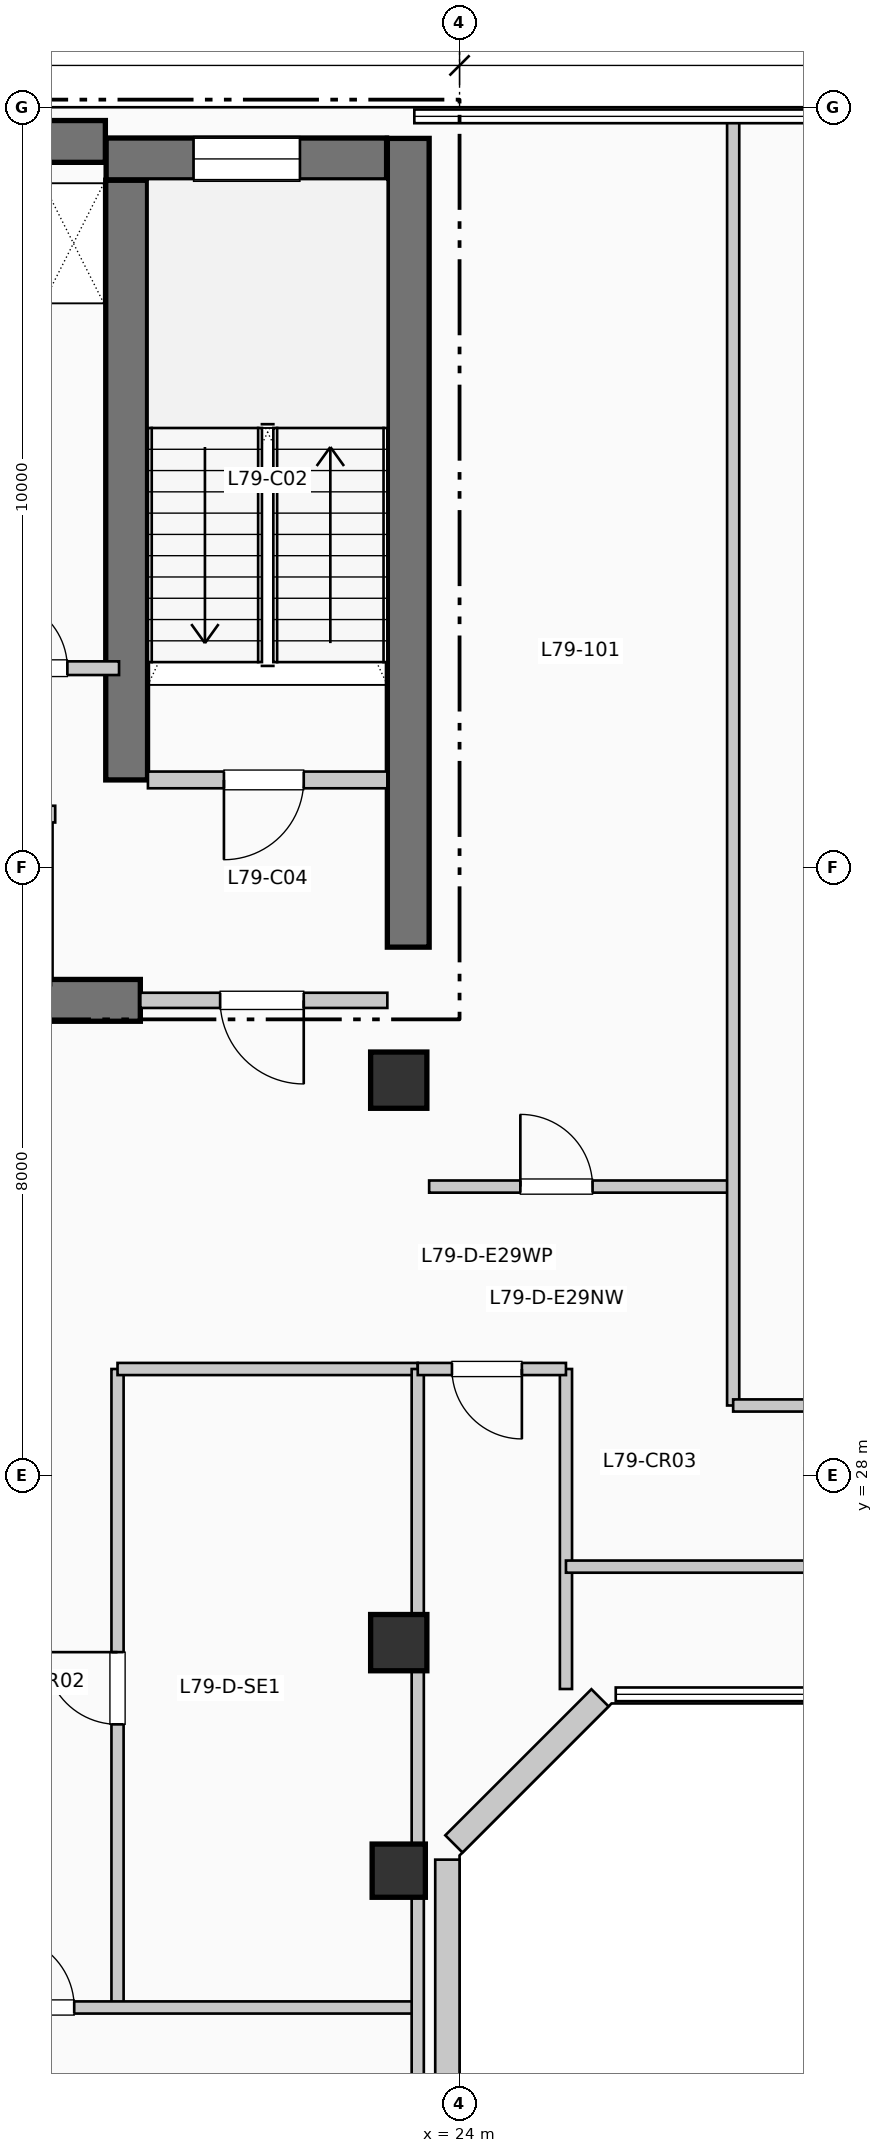
"""IFC4 building model, lengths in metres.
Left out: names, types, materials, properties, quantities, classifications, styles, units other than length and angle.
Written with IfcOpenShell. Run it as: python <this file> out.ifc"""

import sys

from ifc_helpers import new_model, si_unit, direction, frame, frame_2d, origin, origin_2d, place, context, subcontext, project, spatial, rectangle, extrude, element, fill, save


model = new_model("IFC4")
c1 = context("Model", 3, precision=1e-05, world=origin(), true_north=direction((0.0, 1.0)))
c2 = subcontext(c1, "Body", "Model", "MODEL_VIEW")
j1 = project(units=[si_unit("LENGTHUNIT", "METRE"), si_unit("PLANEANGLEUNIT", "RADIAN")], contexts=[c1])
p1 = place(None, origin())
s1 = spatial("IfcSite", under=j1, at=p1, CompositionType="ELEMENT")
p2 = place(p1, origin())
s2 = spatial("IfcBuilding", under=s1, at=p2, CompositionType="ELEMENT")
p3 = place(p2, frame((0.0, 0.0, 323.73)))
s3 = spatial("IfcBuildingStorey", under=s2, at=p3, CompositionType="ELEMENT", Elevation=323.73)
p4 = place(p3, frame((5.36, 45.55, 0.0), z_axis=(0.0, 0.0, 1.0), x_axis=(1.0, 0.0, 0.0)))
e1 = element("IfcWall", 1, at=p4, inside=s3, PredefinedType="SHEAR", context=c2, shape_type="SweptSolid", body=[
    extrude(rectangle(XDim=13.98, YDim=0.55, at=frame_2d((6.99, 0.0))), origin(), (0.0, 0.0, 1.0), 3.96),
])
p5 = place(p3, frame((23.325, 34.95, 0.0), z_axis=(0.0, 0.0, 1.0), x_axis=(0.0, 1.0, 0.0)))
e2 = element("IfcWall", 2, at=p5, inside=s3, PredefinedType="SHEAR", context=c2, shape_type="SweptSolid", body=[
    extrude(rectangle(XDim=10.64, YDim=0.55, at=frame_2d((5.32, 0.0))), origin(), (0.0, 0.0, 1.0), 3.96),
])
p6 = place(p3, frame((13.68, 34.25, 0.0), z_axis=(0.0, 0.0, 1.0), x_axis=(1.0, 0.0, 0.0)))
e3 = element("IfcWall", 3, at=p6, inside=s3, PredefinedType="SHEAR", context=c2, shape_type="SweptSolid", body=[
    extrude(rectangle(XDim=6.12, YDim=0.55, at=frame_2d((3.06, 0.0))), origin(), (0.0, 0.0, 1.0), 3.96),
])
p7 = place(p3, frame((19.62, 37.15, 0.0), z_axis=(0.0, 0.0, 1.0), x_axis=(0.0, 1.0, 0.0)))
e4 = element("IfcWall", 4, at=p7, inside=s3, PredefinedType="SHEAR", context=c2, shape_type="SweptSolid", body=[
    extrude(rectangle(XDim=7.89, YDim=0.55, at=frame_2d((3.945, 0.0))), origin(), (0.0, 0.0, 1.0), 3.96),
])
p8 = place(p3, frame((19.35, 45.32, 0.0), z_axis=(0.0, 0.0, 1.0), x_axis=(1.0, 0.0, 0.0)))
e5 = element("IfcWall", 5, at=p8, inside=s3, PredefinedType="SHEAR", context=c2, shape_type="SweptSolid", body=[
    extrude(rectangle(XDim=3.69, YDim=0.55, at=frame_2d((1.845, 0.0))), origin(), (0.0, 0.0, 1.0), 3.96),
])
p9 = place(p8, frame((1.15, 0.0, 1.05)))
e6 = element("IfcOpeningElement", 6, at=p9, cuts=e5, PredefinedType="OPENING", context=c2, shape_type="SweptSolid", body=[
    extrude(rectangle(XDim=1.4, YDim=1.8, at=frame_2d((0.7, 0.9))), frame((0.0, 0.285, 0.0), z_axis=(0.0, -1.0, 0.0), x_axis=(1.0, 0.0, 0.0)), (0.0, 0.0, 1.0), 0.57),
])
p10 = place(p3, frame((23.2, 22.8, 0.0), z_axis=(0.0, 0.0, 1.0), x_axis=(1.0, 0.0, 0.0)))
e7 = element("IfcColumn", 7, at=p10, inside=s3, PredefinedType="COLUMN", context=c2, shape_type="SweptSolid", body=[
    extrude(rectangle(XDim=0.7, YDim=0.7, at=origin_2d()), origin(), (0.0, 0.0, 1.0), 3.96),
])
for number, where, z_axis, x_axis in (
    (8, (23.2, 25.8, 0.0), (0.0, 0.0, 1.0), (1.0, 0.0, 0.0)),
    (9, (23.2, 33.2, 0.0), (0.0, 0.0, 1.0), (1.0, 0.0, 0.0)),
):
    element("IfcColumn", number, at=place(p3, frame(where, z_axis=z_axis, x_axis=x_axis)), inside=s3, PredefinedType="COLUMN", context=c2, shape_type="SweptSolid", body=[
        extrude(rectangle(XDim=0.74, YDim=0.74, at=origin_2d()), origin(), (0.0, 0.0, 1.0), 3.96),
    ])
p11 = place(p3, frame((23.84, 8.855, 0.0), z_axis=(0.0, 0.0, 1.0), x_axis=(0.0, 1.0, 0.0)))
e10 = element("IfcWall", 10, at=p11, inside=s3, PredefinedType="SOLIDWALL", context=c2, shape_type="SweptSolid", body=[
    extrude(rectangle(XDim=14.09, YDim=0.32, at=frame_2d((7.045, 0.0))), origin(), (0.0, 0.0, 1.0), 3.74),
])
p12 = place(p3, frame((23.926, 23.152, 0.0), z_axis=(0.0, 0.0, 1.0), x_axis=(0.707106781187, 0.707106781187, 0.0)))
e11 = element("IfcWall", 11, at=p12, inside=s3, PredefinedType="SOLIDWALL", context=c2, shape_type="SweptSolid", body=[
    extrude(rectangle(XDim=2.718, YDim=0.32, at=frame_2d((1.359, 0.0))), origin(), (0.0, 0.0, 1.0), 3.74),
])
p13 = place(p3, frame((19.9, 37.15, 0.0), z_axis=(0.0, 0.0, 1.0), x_axis=(1.0, 0.0, 0.0)))
e12 = element("IfcWall", 12, at=p13, inside=s3, PredefinedType="PARTITIONING", context=c2, shape_type="SweptSolid", body=[
    extrude(rectangle(XDim=3.15, YDim=0.22, at=frame_2d((1.575, 0.0))), origin(), (0.0, 0.0, 1.0), 3.74),
])
p14 = place(p13, frame((2.05, 0.0, 0.0), z_axis=(0.0, 0.0, 1.0), x_axis=(-1.0, 0.0, 0.0)))
e13 = element("IfcOpeningElement", 13, at=p14, cuts=e12, PredefinedType="OPENING", context=c2, shape_type="SweptSolid", body=[
    extrude(rectangle(XDim=1.05, YDim=2.15, at=frame_2d((0.525, 1.075))), frame((0.0, 0.12, 0.0), z_axis=(0.0, -1.0, 0.0), x_axis=(1.0, 0.0, 0.0)), (0.0, 0.0, 1.0), 0.24),
])
p15 = place(p3, frame((19.8, 34.25, 0.0), z_axis=(0.0, 0.0, 1.0), x_axis=(1.0, 0.0, 0.0)))
e14 = element("IfcWall", 14, at=p15, inside=s3, PredefinedType="PARTITIONING", context=c2, shape_type="SweptSolid", body=[
    extrude(rectangle(XDim=3.25, YDim=0.2, at=frame_2d((1.625, 0.0))), origin(), (0.0, 0.0, 1.0), 3.74),
])
p16 = place(p15, frame((2.15, 0.0, 0.0), z_axis=(0.0, 0.0, 1.0), x_axis=(-1.0, 0.0, 0.0)))
e15 = element("IfcOpeningElement", 15, at=p16, cuts=e14, PredefinedType="OPENING", context=c2, shape_type="SweptSolid", body=[
    extrude(rectangle(XDim=1.1, YDim=2.15, at=frame_2d((0.55, 1.075))), frame((0.0, 0.11, 0.0), z_axis=(0.0, -1.0, 0.0), x_axis=(1.0, 0.0, 0.0)), (0.0, 0.0, 1.0), 0.22),
])
p17 = place(p3, frame((17.68, 38.62, 0.0), z_axis=(0.0, 0.0, 1.0), x_axis=(1.0, 0.0, 0.0)))
e16 = element("IfcWall", 16, at=p17, inside=s3, PredefinedType="PARTITIONING", context=c2, shape_type="SweptSolid", body=[
    extrude(rectangle(XDim=1.84, YDim=0.18, at=frame_2d((0.92, 0.0))), origin(), (0.0, 0.0, 1.0), 3.74),
])
p18 = place(p17, frame((0.24, 0.0, 0.0)))
e17 = element("IfcOpeningElement", 17, at=p18, cuts=e16, PredefinedType="OPENING", context=c2, shape_type="SweptSolid", body=[
    extrude(rectangle(XDim=0.92, YDim=2.1, at=frame_2d((0.46, 1.05))), frame((0.0, 0.1, 0.0), z_axis=(0.0, -1.0, 0.0), x_axis=(1.0, 0.0, 0.0)), (0.0, 0.0, 1.0), 0.2),
])
p19 = place(p3, frame((16.98, 36.7, 0.0), z_axis=(0.0, 0.0, 1.0), x_axis=(1.0, 0.0, 0.0)))
e18 = element("IfcWall", 18, at=p19, inside=s3, PredefinedType="PARTITIONING", context=c2, shape_type="SweptSolid", body=[
    extrude(rectangle(XDim=1.7, YDim=0.22, at=frame_2d((0.85, 0.0))), origin(), (0.0, 0.0, 1.0), 3.74),
])
p20 = place(p19, frame((0.3, 0.0, 0.0)))
e19 = element("IfcOpeningElement", 19, at=p20, cuts=e18, PredefinedType="OPENING", context=c2, shape_type="SweptSolid", body=[
    extrude(rectangle(XDim=1.1, YDim=2.2, at=frame_2d((0.55, 1.1))), frame((0.0, 0.12, 0.0), z_axis=(0.0, -1.0, 0.0), x_axis=(1.0, 0.0, 0.0)), (0.0, 0.0, 1.0), 0.24),
])
p21 = place(p3, frame((19.5, 21.0, 0.0), z_axis=(0.0, 0.0, 1.0), x_axis=(0.0, 1.0, 0.0)))
e20 = element("IfcWall", 20, at=p21, inside=s3, PredefinedType="PARTITIONING", context=c2, shape_type="SweptSolid", body=[
    extrude(rectangle(XDim=8.4, YDim=0.16, at=frame_2d((4.2, 0.0))), origin(), (0.0, 0.0, 1.0), 3.74),
])
p22 = place(p21, frame((3.725, 0.0, 0.0)))
e21 = element("IfcOpeningElement", 21, at=p22, cuts=e20, PredefinedType="OPENING", context=c2, shape_type="SweptSolid", body=[
    extrude(rectangle(XDim=0.95, YDim=2.15, at=frame_2d((0.475, 1.075))), frame((0.0, 0.09, 0.0), z_axis=(0.0, -1.0, 0.0), x_axis=(1.0, 0.0, 0.0)), (0.0, 0.0, 1.0), 0.18),
])
p23 = place(p3, frame((0.19, 21.0, 0.0), z_axis=(0.0, 0.0, 1.0), x_axis=(1.0, 0.0, 0.0)))
e22 = element("IfcWall", 22, at=p23, inside=s3, PredefinedType="PARTITIONING", context=c2, shape_type="SweptSolid", body=[
    extrude(rectangle(XDim=23.26, YDim=0.16, at=frame_2d((11.63, 0.0))), origin(), (0.0, 0.0, 1.0), 3.74),
])
p24 = place(p23, frame((17.79, 0.0, 0.0)))
e23 = element("IfcOpeningElement", 23, at=p24, cuts=e22, PredefinedType="OPENING", context=c2, shape_type="SweptSolid", body=[
    extrude(rectangle(XDim=0.95, YDim=2.15, at=frame_2d((0.475, 1.075))), frame((0.0, 0.09, 0.0), z_axis=(0.0, -1.0, 0.0), x_axis=(1.0, 0.0, 0.0)), (0.0, 0.0, 1.0), 0.18),
])
p25 = place(p3, frame((19.5, 29.4, 0.0), z_axis=(0.0, 0.0, 1.0), x_axis=(1.0, 0.0, 0.0)))
e24 = element("IfcWall", 24, at=p25, inside=s3, PredefinedType="PARTITIONING", context=c2, shape_type="SweptSolid", body=[
    extrude(rectangle(XDim=3.95, YDim=0.16, at=frame_2d((1.975, 0.0))), origin(), (0.0, 0.0, 1.0), 3.425),
])
p26 = place(p3, frame((23.45, 5.99, 0.0), z_axis=(0.0, 0.0, 1.0), x_axis=(0.0, 1.0, 0.0)))
e25 = element("IfcWall", 25, at=p26, inside=s3, PredefinedType="PARTITIONING", context=c2, shape_type="SweptSolid", body=[
    extrude(rectangle(XDim=23.41, YDim=0.16, at=frame_2d((11.705, 0.0))), origin(), (0.0, 0.0, 1.0), 3.175),
])
p27 = place(p3, frame((25.4, 25.19, 0.0), z_axis=(0.0, 0.0, 1.0), x_axis=(0.0, 1.0, 0.0)))
e26 = element("IfcWall", 26, at=p27, inside=s3, PredefinedType="PARTITIONING", context=c2, shape_type="SweptSolid", body=[
    extrude(rectangle(XDim=4.21, YDim=0.16, at=frame_2d((2.105, 0.0))), origin(), (0.0, 0.0, 1.0), 3.74),
])
p28 = place(p3, frame((23.6, 31.8, 0.0), z_axis=(0.0, 0.0, 1.0), x_axis=(1.0, 0.0, 0.0)))
e27 = element("IfcWall", 27, at=p28, inside=s3, PredefinedType="PARTITIONING", context=c2, shape_type="SweptSolid", body=[
    extrude(rectangle(XDim=4.0, YDim=0.16, at=frame_2d((2.0, 0.0))), origin(), (0.0, 0.0, 1.0), 3.74),
])
p29 = place(p28, frame((1.2, 0.0, 0.0)))
e28 = element("IfcOpeningElement", 28, at=p29, cuts=e27, PredefinedType="OPENING", context=c2, shape_type="SweptSolid", body=[
    extrude(rectangle(XDim=0.95, YDim=2.15, at=frame_2d((0.475, 1.075))), frame((0.0, 0.09, 0.0), z_axis=(0.0, -1.0, 0.0), x_axis=(1.0, 0.0, 0.0)), (0.0, 0.0, 1.0), 0.18),
])
p30 = place(p3, frame((27.6, 28.92, 0.0), z_axis=(0.0, 0.0, 1.0), x_axis=(0.0, 1.0, 0.0)))
e29 = element("IfcWall", 29, at=p30, inside=s3, PredefinedType="PARTITIONING", context=c2, shape_type="SweptSolid", body=[
    extrude(rectangle(XDim=16.89, YDim=0.16, at=frame_2d((8.445, 0.0))), origin(), (0.0, 0.0, 1.0), 3.74),
])
p31 = place(p3, frame((25.4, 26.8, 0.0), z_axis=(0.0, 0.0, 1.0), x_axis=(1.0, 0.0, 0.0)))
e30 = element("IfcWall", 30, at=p31, inside=s3, PredefinedType="PARTITIONING", context=c2, shape_type="SweptSolid", body=[
    extrude(rectangle(XDim=18.81, YDim=0.16, at=frame_2d((9.405, 0.0))), origin(), (0.0, 0.0, 1.0), 3.74),
])
p32 = place(p31, frame((4.45, 0.0, 0.0), z_axis=(0.0, 0.0, 1.0), x_axis=(-1.0, 0.0, 0.0)))
e31 = element("IfcOpeningElement", 31, at=p32, cuts=e30, PredefinedType="OPENING", context=c2, shape_type="SweptSolid", body=[
    extrude(rectangle(XDim=0.95, YDim=2.15, at=frame_2d((0.475, 1.075))), frame((0.0, 0.09, 0.0), z_axis=(0.0, -1.0, 0.0), x_axis=(1.0, 0.0, 0.0)), (0.0, 0.0, 1.0), 0.18),
])
p33 = place(p3, frame((27.6, 28.92, 0.0), z_axis=(0.0, 0.0, 1.0), x_axis=(1.0, 0.0, 0.0)))
e32 = element("IfcWall", 32, at=p33, inside=s3, PredefinedType="PARTITIONING", context=c2, shape_type="SweptSolid", body=[
    extrude(rectangle(XDim=16.61, YDim=0.16, at=frame_2d((8.305, 0.0))), origin(), (0.0, 0.0, 1.0), 3.74),
])
p34 = place(p33, frame((2.5, 0.0, 0.0)))
e33 = element("IfcOpeningElement", 33, at=p34, cuts=e32, PredefinedType="OPENING", context=c2, shape_type="SweptSolid", body=[
    extrude(rectangle(XDim=0.95, YDim=2.15, at=frame_2d((0.475, 1.075))), frame((0.0, 0.09, 0.0), z_axis=(0.0, -1.0, 0.0), x_axis=(1.0, 0.0, 0.0)), (0.0, 0.0, 1.0), 0.18),
])
p35 = place(p33, frame((11.0, 0.0, 0.0)))
e34 = element("IfcOpeningElement", 34, at=p35, cuts=e32, PredefinedType="OPENING", context=c2, shape_type="SweptSolid", body=[
    extrude(rectangle(XDim=0.95, YDim=2.15, at=frame_2d((0.475, 1.075))), frame((0.0, 0.09, 0.0), z_axis=(0.0, -1.0, 0.0), x_axis=(1.0, 0.0, 0.0)), (0.0, 0.0, 1.0), 0.18),
])
p36 = place(p3, frame((23.45, 29.4, 0.0), z_axis=(0.0, 0.0, 1.0), x_axis=(1.0, 0.0, 0.0)))
e35 = element("IfcWall", 35, at=p36, inside=s3, PredefinedType="PARTITIONING", context=c2, shape_type="SweptSolid", body=[
    extrude(rectangle(XDim=1.95, YDim=0.16, at=frame_2d((0.975, 0.0))), origin(), (0.0, 0.0, 1.0), 3.425),
])
p37 = place(p36, frame((1.37, 0.0, 0.0), z_axis=(0.0, 0.0, 1.0), x_axis=(-1.0, 0.0, 0.0)))
e36 = element("IfcOpeningElement", 36, at=p37, cuts=e35, PredefinedType="OPENING", context=c2, shape_type="SweptSolid", body=[
    extrude(rectangle(XDim=0.92, YDim=2.1, at=frame_2d((0.46, 1.05))), frame((0.0, 0.09, 0.0), z_axis=(0.0, -1.0, 0.0), x_axis=(1.0, 0.0, 0.0)), (0.0, 0.0, 1.0), 0.18),
])
p38 = place(p9, origin())
e37 = element("IfcWindow", 37, at=p38, inside=s3, PartitioningType="SINGLE_PANEL", PredefinedType="WINDOW", context=c2, shape_type="SweptSolid", body=[
    extrude(rectangle(XDim=1.4, YDim=1.8, at=frame_2d((0.7, 0.9))), frame((0.0, 0.03, 0.0), z_axis=(0.0, -1.0, 0.0), x_axis=(1.0, 0.0, 0.0)), (0.0, 0.0, 1.0), 0.06),
])
fill(e6, e37)
p39 = place(p14, origin())
e38 = element("IfcDoor", 38, at=p39, inside=s3, OperationType="SINGLE_SWING_LEFT", PredefinedType="DOOR", context=c2, shape_type="SweptSolid", body=[
    extrude(rectangle(XDim=1.05, YDim=2.15, at=frame_2d((0.525, 1.075))), frame((0.0, 0.025, 0.0), z_axis=(0.0, -1.0, 0.0), x_axis=(1.0, 0.0, 0.0)), (0.0, 0.0, 1.0), 0.05),
])
fill(e13, e38)
p40 = place(p16, origin())
e39 = element("IfcDoor", 39, at=p40, inside=s3, OperationType="SINGLE_SWING_RIGHT", PredefinedType="DOOR", context=c2, shape_type="SweptSolid", body=[
    extrude(rectangle(XDim=1.1, YDim=2.15, at=frame_2d((0.55, 1.075))), frame((0.0, 0.025, 0.0), z_axis=(0.0, -1.0, 0.0), x_axis=(1.0, 0.0, 0.0)), (0.0, 0.0, 1.0), 0.05),
])
fill(e15, e39)
p41 = place(p18, origin())
e40 = element("IfcDoor", 40, at=p41, inside=s3, OperationType="SINGLE_SWING_LEFT", PredefinedType="DOOR", context=c2, shape_type="SweptSolid", body=[
    extrude(rectangle(XDim=0.92, YDim=2.1, at=frame_2d((0.46, 1.05))), frame((0.0, 0.025, 0.0), z_axis=(0.0, -1.0, 0.0), x_axis=(1.0, 0.0, 0.0)), (0.0, 0.0, 1.0), 0.05),
])
fill(e17, e40)
p42 = place(p24, origin())
e41 = element("IfcDoor", 41, at=p42, inside=s3, OperationType="SINGLE_SWING_LEFT", PredefinedType="DOOR", context=c2, shape_type="SweptSolid", body=[
    extrude(rectangle(XDim=0.95, YDim=2.15, at=frame_2d((0.475, 1.075))), frame((0.0, 0.025, 0.0), z_axis=(0.0, -1.0, 0.0), x_axis=(1.0, 0.0, 0.0)), (0.0, 0.0, 1.0), 0.05),
])
fill(e23, e41)
p43 = place(p22, origin())
e42 = element("IfcDoor", 42, at=p43, inside=s3, OperationType="SINGLE_SWING_RIGHT", PredefinedType="DOOR", context=c2, shape_type="SweptSolid", body=[
    extrude(rectangle(XDim=0.95, YDim=2.15, at=frame_2d((0.475, 1.075))), frame((0.0, 0.025, 0.0), z_axis=(0.0, -1.0, 0.0), x_axis=(1.0, 0.0, 0.0)), (0.0, 0.0, 1.0), 0.05),
])
fill(e21, e42)
p44 = place(p29, origin())
e43 = element("IfcDoor", 43, at=p44, inside=s3, OperationType="SINGLE_SWING_LEFT", PredefinedType="DOOR", context=c2, shape_type="SweptSolid", body=[
    extrude(rectangle(XDim=0.95, YDim=2.15, at=frame_2d((0.475, 1.075))), frame((0.0, 0.025, 0.0), z_axis=(0.0, -1.0, 0.0), x_axis=(1.0, 0.0, 0.0)), (0.0, 0.0, 1.0), 0.05),
])
fill(e28, e43)
p45 = place(p37, origin())
e44 = element("IfcDoor", 44, at=p45, inside=s3, OperationType="SINGLE_SWING_RIGHT", PredefinedType="DOOR", context=c2, shape_type="SweptSolid", body=[
    extrude(rectangle(XDim=0.92, YDim=2.1, at=frame_2d((0.46, 1.05))), frame((0.0, 0.025, 0.0), z_axis=(0.0, -1.0, 0.0), x_axis=(1.0, 0.0, 0.0)), (0.0, 0.0, 1.0), 0.05),
])
fill(e36, e44)
save(model, sys.argv[1])
